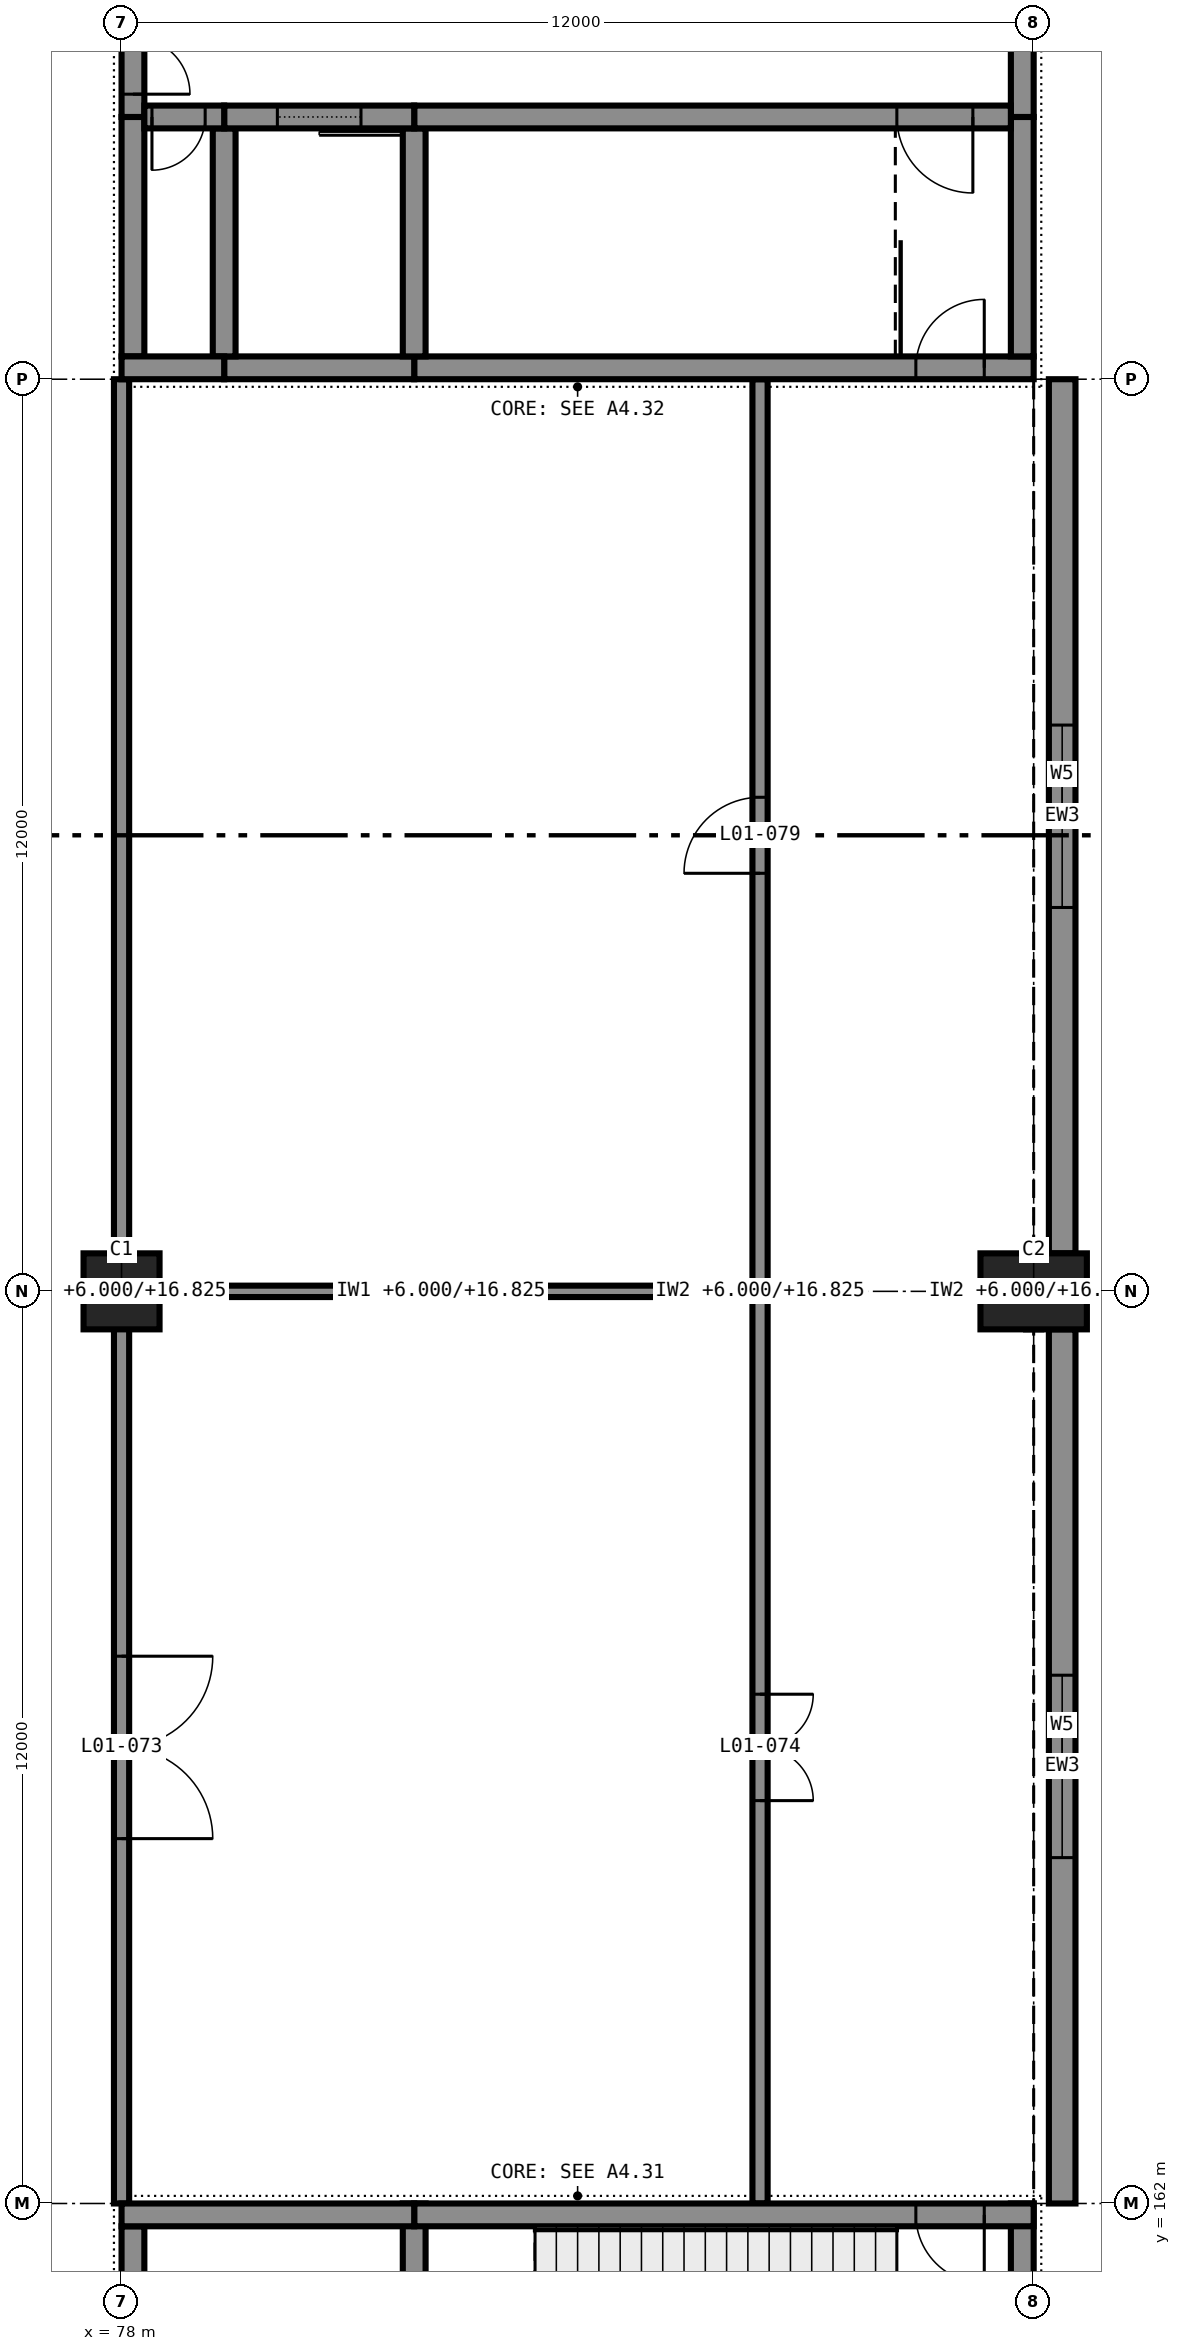
"""IFC4 building model, lengths in metres.
Left out: names, types, materials, properties, quantities, classifications, styles, units other than length and angle.
Written with IfcOpenShell. Run it as: python <this file> out.ifc"""

import sys

from ifc_helpers import new_model, si_unit, direction, frame, frame_2d, origin, origin_2d, place, context, subcontext, project, spatial, rectangle, extrude, element, fill, save


model = new_model("IFC4")
c1 = context("Model", 3, precision=1e-05, world=origin(), true_north=direction((0.0, 1.0)))
c2 = subcontext(c1, "Body", "Model", "MODEL_VIEW")
j1 = project(units=[si_unit("LENGTHUNIT", "METRE"), si_unit("PLANEANGLEUNIT", "RADIAN")], contexts=[c1])
p1 = place(None, origin())
s1 = spatial("IfcSite", under=j1, at=p1, CompositionType="ELEMENT")
p2 = place(p1, origin())
s2 = spatial("IfcBuilding", under=s1, at=p2, CompositionType="ELEMENT")
p3 = place(p2, frame((0.0, 0.0, 6.0)))
s3 = spatial("IfcBuildingStorey", under=s2, at=p3, CompositionType="ELEMENT", Elevation=6.0)
p4 = place(p3, frame((78.0, 174.0, 0.0), z_axis=(0.0, 0.0, 1.0), x_axis=(1.0, 0.0, 0.0)))
e1 = element("IfcColumn", 1, at=p4, inside=s3, PredefinedType="COLUMN", context=c2, shape_type="SweptSolid", body=[
    extrude(rectangle(XDim=1.0, YDim=1.0, at=origin_2d()), origin(), (0.0, 0.0, 1.0), 6.0),
])
p5 = place(p3, frame((90.0, 174.0, 0.0), z_axis=(0.0, 0.0, 1.0), x_axis=(1.0, 0.0, 0.0)))
e2 = element("IfcColumn", 2, at=p5, inside=s3, PredefinedType="COLUMN", context=c2, shape_type="SweptSolid", body=[
    extrude(rectangle(XDim=1.4, YDim=1.0, at=origin_2d()), origin(), (0.0, 0.0, 1.0), 6.0),
])
p6 = place(p3, frame((90.0, 161.85, 0.0), z_axis=(0.0, 0.0, 1.0), x_axis=(-1.0, 0.0, 0.0)))
e3 = element("IfcWall", 3, at=p6, inside=s3, PredefinedType="SHEAR", context=c2, shape_type="SweptSolid", body=[
    extrude(rectangle(XDim=8.15, YDim=0.3, at=frame_2d((4.075, 0.0))), origin(), (0.0, 0.0, 1.0), 5.75),
])
p7 = place(p6, frame((0.65, 0.0, 0.0)))
e4 = element("IfcOpeningElement", 4, at=p7, cuts=e3, PredefinedType="OPENING", context=c2, shape_type="SweptSolid", body=[
    extrude(rectangle(XDim=0.9, YDim=2.1, at=frame_2d((0.45, 1.05))), frame((0.0, 0.16, 0.0), z_axis=(0.0, -1.0, 0.0), x_axis=(1.0, 0.0, 0.0)), (0.0, 0.0, 1.0), 0.32),
])
p8 = place(p3, frame((81.85, 161.85, 0.0), z_axis=(0.0, 0.0, 1.0), x_axis=(-1.0, 0.0, 0.0)))
e5 = element("IfcWall", 5, at=p8, inside=s3, PredefinedType="SHEAR", context=c2, shape_type="SweptSolid", body=[
    extrude(rectangle(XDim=3.85, YDim=0.3, at=frame_2d((1.925, 0.0))), origin(), (0.0, 0.0, 1.0), 5.75),
])
p9 = place(p3, frame((89.85, 158.55, 0.0), z_axis=(0.0, 0.0, 1.0), x_axis=(0.0, 1.0, 0.0)))
e6 = element("IfcWall", 6, at=p9, inside=s3, PredefinedType="SHEAR", context=c2, shape_type="SweptSolid", body=[
    extrude(rectangle(XDim=3.45, YDim=0.3, at=frame_2d((1.725, 0.0))), origin(), (0.0, 0.0, 1.0), 5.75),
])
p10 = place(p3, frame((78.15, 158.55, 0.0), z_axis=(0.0, 0.0, 1.0), x_axis=(0.0, 1.0, 0.0)))
e7 = element("IfcWall", 7, at=p10, inside=s3, PredefinedType="SHEAR", context=c2, shape_type="SweptSolid", body=[
    extrude(rectangle(XDim=3.15, YDim=0.3, at=frame_2d((1.575, 0.0))), origin(), (0.0, 0.0, 1.0), 5.75),
])
p11 = place(p10, frame((1.15, 0.0, 0.0)))
e8 = element("IfcOpeningElement", 8, at=p11, cuts=e7, PredefinedType="OPENING", context=c2, shape_type="SweptSolid", body=[
    extrude(rectangle(XDim=1.0, YDim=2.1, at=frame_2d((0.5, 1.05))), frame((0.0, 0.16, 0.0), z_axis=(0.0, -1.0, 0.0), x_axis=(1.0, 0.0, 0.0)), (0.0, 0.0, 1.0), 0.32),
])
p12 = place(p3, frame((81.85, 158.7, 0.0), z_axis=(0.0, 0.0, 1.0), x_axis=(0.0, 1.0, 0.0)))
e9 = element("IfcWall", 9, at=p12, inside=s3, PredefinedType="SHEAR", context=c2, shape_type="SweptSolid", body=[
    extrude(rectangle(XDim=3.3, YDim=0.3, at=frame_2d((1.65, 0.0))), origin(), (0.0, 0.0, 1.0), 5.75),
])
p13 = place(p3, frame((90.0, 186.15, 0.0), z_axis=(0.0, 0.0, 1.0), x_axis=(-1.0, 0.0, 0.0)))
e10 = element("IfcWall", 10, at=p13, inside=s3, PredefinedType="SHEAR", context=c2, shape_type="SweptSolid", body=[
    extrude(rectangle(XDim=8.15, YDim=0.3, at=frame_2d((4.075, 0.0))), origin(), (0.0, 0.0, 1.0), 6.0),
])
p14 = place(p13, frame((0.65, 0.0, 0.0)))
e11 = element("IfcOpeningElement", 11, at=p14, cuts=e10, PredefinedType="OPENING", context=c2, shape_type="SweptSolid", body=[
    extrude(rectangle(XDim=0.9, YDim=2.1, at=frame_2d((0.45, 1.05))), frame((0.0, 0.16, 0.0), z_axis=(0.0, -1.0, 0.0), x_axis=(1.0, 0.0, 0.0)), (0.0, 0.0, 1.0), 0.32),
])
p15 = place(p3, frame((81.85, 186.15, 0.0), z_axis=(0.0, 0.0, 1.0), x_axis=(-1.0, 0.0, 0.0)))
e12 = element("IfcWall", 12, at=p15, inside=s3, PredefinedType="SHEAR", context=c2, shape_type="SweptSolid", body=[
    extrude(rectangle(XDim=2.5, YDim=0.3, at=frame_2d((1.25, 0.0))), origin(), (0.0, 0.0, 1.0), 6.0),
])
p16 = place(p3, frame((79.35, 186.15, 0.0), z_axis=(0.0, 0.0, 1.0), x_axis=(-1.0, 0.0, 0.0)))
e13 = element("IfcWall", 13, at=p16, inside=s3, PredefinedType="SHEAR", context=c2, shape_type="SweptSolid", body=[
    extrude(rectangle(XDim=1.35, YDim=0.3, at=frame_2d((0.675, 0.0))), origin(), (0.0, 0.0, 1.0), 6.0),
])
p17 = place(p3, frame((89.7, 189.45, 0.0), z_axis=(0.0, 0.0, 1.0), x_axis=(-1.0, 0.0, 0.0)))
e14 = element("IfcWall", 14, at=p17, inside=s3, PredefinedType="SHEAR", context=c2, shape_type="SweptSolid", body=[
    extrude(rectangle(XDim=7.85, YDim=0.3, at=frame_2d((3.925, 0.0))), origin(), (0.0, 0.0, 1.0), 6.0),
])
p18 = place(p17, frame((0.5, 0.0, 0.0)))
e15 = element("IfcOpeningElement", 15, at=p18, cuts=e14, PredefinedType="OPENING", context=c2, shape_type="SweptSolid", body=[
    extrude(rectangle(XDim=1.0, YDim=2.1, at=frame_2d((0.5, 1.05))), frame((0.0, 0.16, 0.0), z_axis=(0.0, -1.0, 0.0), x_axis=(1.0, 0.0, 0.0)), (0.0, 0.0, 1.0), 0.32),
])
p19 = place(p3, frame((81.85, 189.45, 0.0), z_axis=(0.0, 0.0, 1.0), x_axis=(-1.0, 0.0, 0.0)))
e16 = element("IfcWall", 16, at=p19, inside=s3, PredefinedType="SHEAR", context=c2, shape_type="SweptSolid", body=[
    extrude(rectangle(XDim=2.5, YDim=0.3, at=frame_2d((1.25, 0.0))), origin(), (0.0, 0.0, 1.0), 6.0),
])
p20 = place(p19, frame((0.7, 0.0, 0.0)))
e17 = element("IfcOpeningElement", 17, at=p20, cuts=e16, PredefinedType="OPENING", context=c2, shape_type="SweptSolid", body=[
    extrude(rectangle(XDim=1.1, YDim=2.1, at=frame_2d((0.55, 1.05))), frame((0.0, 0.16, 0.0), z_axis=(0.0, -1.0, 0.0), x_axis=(1.0, 0.0, 0.0)), (0.0, 0.0, 1.0), 0.32),
])
p21 = place(p3, frame((79.35, 189.45, 0.0), z_axis=(0.0, 0.0, 1.0), x_axis=(-1.0, 0.0, 0.0)))
e18 = element("IfcWall", 18, at=p21, inside=s3, PredefinedType="SHEAR", context=c2, shape_type="SweptSolid", body=[
    extrude(rectangle(XDim=1.05, YDim=0.3, at=frame_2d((0.525, 0.0))), origin(), (0.0, 0.0, 1.0), 6.0),
])
p22 = place(p21, frame((0.25, 0.0, 0.0)))
e19 = element("IfcOpeningElement", 19, at=p22, cuts=e18, PredefinedType="OPENING", context=c2, shape_type="SweptSolid", body=[
    extrude(rectangle(XDim=0.7, YDim=2.1, at=frame_2d((0.35, 1.05))), frame((0.0, 0.16, 0.0), z_axis=(0.0, -1.0, 0.0), x_axis=(1.0, 0.0, 0.0)), (0.0, 0.0, 1.0), 0.32),
])
p23 = place(p3, frame((89.85, 186.3, 0.0), z_axis=(0.0, 0.0, 1.0), x_axis=(0.0, 1.0, 0.0)))
e20 = element("IfcWall", 20, at=p23, inside=s3, PredefinedType="SHEAR", context=c2, shape_type="SweptSolid", body=[
    extrude(rectangle(XDim=3.15, YDim=0.3, at=frame_2d((1.575, 0.0))), origin(), (0.0, 0.0, 1.0), 6.0),
])
p24 = place(p3, frame((89.85, 189.45, 0.0), z_axis=(0.0, 0.0, 1.0), x_axis=(0.0, 1.0, 0.0)))
e21 = element("IfcWall", 21, at=p24, inside=s3, PredefinedType="SHEAR", context=c2, shape_type="SweptSolid", body=[
    extrude(rectangle(XDim=5.1, YDim=0.3, at=frame_2d((2.55, 0.0))), origin(), (0.0, 0.0, 1.0), 6.0),
])
p25 = place(p3, frame((78.15, 186.3, 0.0), z_axis=(0.0, 0.0, 1.0), x_axis=(0.0, 1.0, 0.0)))
e22 = element("IfcWall", 22, at=p25, inside=s3, PredefinedType="SHEAR", context=c2, shape_type="SweptSolid", body=[
    extrude(rectangle(XDim=3.15, YDim=0.3, at=frame_2d((1.575, 0.0))), origin(), (0.0, 0.0, 1.0), 6.0),
])
p26 = place(p3, frame((78.15, 189.45, 0.0), z_axis=(0.0, 0.0, 1.0), x_axis=(0.0, 1.0, 0.0)))
e23 = element("IfcWall", 23, at=p26, inside=s3, PredefinedType="SHEAR", context=c2, shape_type="SweptSolid", body=[
    extrude(rectangle(XDim=5.1, YDim=0.3, at=frame_2d((2.55, 0.0))), origin(), (0.0, 0.0, 1.0), 6.0),
])
p27 = place(p26, frame((0.3, 0.0, 0.0)))
e24 = element("IfcOpeningElement", 24, at=p27, cuts=e23, PredefinedType="OPENING", context=c2, shape_type="SweptSolid", body=[
    extrude(rectangle(XDim=1.5, YDim=2.1, at=frame_2d((0.75, 1.05))), frame((0.0, 0.16, 0.0), z_axis=(0.0, -1.0, 0.0), x_axis=(1.0, 0.0, 0.0)), (0.0, 0.0, 1.0), 0.32),
])
for number, where, z_axis, x_axis in (
    (25, (81.85, 186.3, 0.0), (0.0, 0.0, 1.0), (0.0, 1.0, 0.0)),
    (26, (79.35, 186.3, 0.0), (0.0, 0.0, 1.0), (0.0, 1.0, 0.0)),
):
    element("IfcWall", number, at=place(p3, frame(where, z_axis=z_axis, x_axis=x_axis)), inside=s3, PredefinedType="SHEAR", context=c2, shape_type="SweptSolid", body=[
        extrude(rectangle(XDim=3.0, YDim=0.3, at=frame_2d((1.5, 0.0))), origin(), (0.0, 0.0, 1.0), 6.0),
    ])
p28 = place(p3, frame((90.375, 162.0, 0.0), z_axis=(0.0, 0.0, 1.0), x_axis=(0.0, 1.0, 0.0)))
e27 = element("IfcWall", 27, at=p28, inside=s3, PredefinedType="STANDARD", context=c2, shape_type="SweptSolid", body=[
    extrude(rectangle(XDim=11.5, YDim=0.35, at=frame_2d((5.75, 0.0))), origin(), (0.0, 0.0, 1.0), 6.0),
])
p29 = place(p28, frame((4.55, 0.0, 0.9)))
e28 = element("IfcOpeningElement", 28, at=p29, cuts=e27, PredefinedType="OPENING", context=c2, shape_type="SweptSolid", body=[
    extrude(rectangle(XDim=2.4, YDim=1.8, at=frame_2d((1.2, 0.9))), frame((0.0, 0.185, 0.0), z_axis=(0.0, -1.0, 0.0), x_axis=(1.0, 0.0, 0.0)), (0.0, 0.0, 1.0), 0.37),
])
p30 = place(p3, frame((90.375, 174.5, 0.0), z_axis=(0.0, 0.0, 1.0), x_axis=(0.0, 1.0, 0.0)))
e29 = element("IfcWall", 29, at=p30, inside=s3, PredefinedType="STANDARD", context=c2, shape_type="SweptSolid", body=[
    extrude(rectangle(XDim=11.5, YDim=0.35, at=frame_2d((5.75, 0.0))), origin(), (0.0, 0.0, 1.0), 6.0),
])
p31 = place(p30, frame((4.55, 0.0, 0.9)))
e30 = element("IfcOpeningElement", 30, at=p31, cuts=e29, PredefinedType="OPENING", context=c2, shape_type="SweptSolid", body=[
    extrude(rectangle(XDim=2.4, YDim=1.8, at=frame_2d((1.2, 0.9))), frame((0.0, 0.185, 0.0), z_axis=(0.0, -1.0, 0.0), x_axis=(1.0, 0.0, 0.0)), (0.0, 0.0, 1.0), 0.37),
])
p32 = place(p3, frame((78.1, 174.0, 0.0), z_axis=(0.0, 0.0, 1.0), x_axis=(1.0, 0.0, 0.0)))
e31 = element("IfcWall", 31, at=p32, inside=s3, PredefinedType="PARTITIONING", context=c2, shape_type="SweptSolid", body=[
    extrude(rectangle(XDim=8.2, YDim=0.15, at=frame_2d((4.1, 0.0))), origin(), (0.0, 0.0, 1.0), 10.825),
])
p33 = place(p3, frame((78.0, 162.0, 0.0), z_axis=(0.0, 0.0, 1.0), x_axis=(0.0, 1.0, 0.0)))
e32 = element("IfcWall", 32, at=p33, inside=s3, PredefinedType="PARTITIONING", context=c2, shape_type="SweptSolid", body=[
    extrude(rectangle(XDim=24.0, YDim=0.2, at=frame_2d((12.0, 0.0))), origin(), (0.0, 0.0, 1.0), 10.825),
])
p34 = place(p33, frame((4.8, 0.0, 0.0)))
e33 = element("IfcOpeningElement", 33, at=p34, cuts=e32, PredefinedType="OPENING", context=c2, shape_type="SweptSolid", body=[
    extrude(rectangle(XDim=2.4, YDim=2.4, at=frame_2d((1.2, 1.2))), frame((0.0, 0.11, 0.0), z_axis=(0.0, -1.0, 0.0), x_axis=(1.0, 0.0, 0.0)), (0.0, 0.0, 1.0), 0.22),
])
p35 = place(p3, frame((86.4, 162.0, 0.0), z_axis=(0.0, 0.0, 1.0), x_axis=(0.0, 1.0, 0.0)))
e34 = element("IfcWall", 34, at=p35, inside=s3, PredefinedType="PARTITIONING", context=c2, shape_type="SweptSolid", body=[
    extrude(rectangle(XDim=24.0, YDim=0.2, at=frame_2d((12.0, 0.0))), origin(), (0.0, 0.0, 1.0), 10.825),
])
p36 = place(p35, frame((5.3, 0.0, 0.0)))
e35 = element("IfcOpeningElement", 35, at=p36, cuts=e34, PredefinedType="OPENING", context=c2, shape_type="SweptSolid", body=[
    extrude(rectangle(XDim=1.4, YDim=2.1, at=frame_2d((0.7, 1.05))), frame((0.0, 0.11, 0.0), z_axis=(0.0, -1.0, 0.0), x_axis=(1.0, 0.0, 0.0)), (0.0, 0.0, 1.0), 0.22),
])
p37 = place(p35, frame((17.5, 0.0, 0.0)))
e36 = element("IfcOpeningElement", 36, at=p37, cuts=e34, PredefinedType="OPENING", context=c2, shape_type="SweptSolid", body=[
    extrude(rectangle(XDim=1.0, YDim=2.1, at=frame_2d((0.5, 1.05))), frame((0.0, 0.11, 0.0), z_axis=(0.0, -1.0, 0.0), x_axis=(1.0, 0.0, 0.0)), (0.0, 0.0, 1.0), 0.22),
])
p38 = place(p3, frame((90.0, 173.5, 0.0), z_axis=(0.0, 0.0, 1.0), x_axis=(0.0, 1.0, 0.0)))
e37 = element("IfcWall", 37, at=p38, inside=s3, PredefinedType="PARTITIONING", context=c2, shape_type="SweptSolid", body=[
    extrude(rectangle(XDim=1.0, YDim=0.2, at=frame_2d((0.5, 0.0))), origin(), (0.0, 0.0, 1.0), 10.825),
])
p39 = place(p29, origin())
e38 = element("IfcWindow", 38, at=p39, inside=s3, PartitioningType="SINGLE_PANEL", PredefinedType="WINDOW", context=c2, shape_type="SweptSolid", body=[
    extrude(rectangle(XDim=2.4, YDim=1.8, at=frame_2d((1.2, 0.9))), frame((0.0, 0.03, 0.0), z_axis=(0.0, -1.0, 0.0), x_axis=(1.0, 0.0, 0.0)), (0.0, 0.0, 1.0), 0.06),
])
fill(e28, e38)
p40 = place(p31, origin())
e39 = element("IfcWindow", 39, at=p40, inside=s3, PartitioningType="SINGLE_PANEL", PredefinedType="WINDOW", context=c2, shape_type="SweptSolid", body=[
    extrude(rectangle(XDim=2.4, YDim=1.8, at=frame_2d((1.2, 0.9))), frame((0.0, 0.03, 0.0), z_axis=(0.0, -1.0, 0.0), x_axis=(1.0, 0.0, 0.0)), (0.0, 0.0, 1.0), 0.06),
])
fill(e30, e39)
p41 = place(p7, origin())
e40 = element("IfcDoor", 40, at=p41, inside=s3, OperationType="SINGLE_SWING_RIGHT", PredefinedType="DOOR", context=c2, shape_type="SweptSolid", body=[
    extrude(rectangle(XDim=0.9, YDim=2.1, at=frame_2d((0.45, 1.05))), frame((0.0, 0.025, 0.0), z_axis=(0.0, -1.0, 0.0), x_axis=(1.0, 0.0, 0.0)), (0.0, 0.0, 1.0), 0.05),
])
fill(e4, e40)
p42 = place(p34, frame((2.4, 0.0, 0.0), z_axis=(0.0, 0.0, 1.0), x_axis=(-1.0, 0.0, 0.0)))
e41 = element("IfcDoor", 41, at=p42, inside=s3, OperationType="DOUBLE_DOOR_SINGLE_SWING", PredefinedType="DOOR", context=c2, shape_type="SweptSolid", body=[
    extrude(rectangle(XDim=2.4, YDim=2.4, at=frame_2d((1.2, 1.2))), frame((0.0, 0.025, 0.0), z_axis=(0.0, -1.0, 0.0), x_axis=(1.0, 0.0, 0.0)), (0.0, 0.0, 1.0), 0.05),
])
fill(e33, e41)
p43 = place(p36, frame((1.4, 0.0, 0.0), z_axis=(0.0, 0.0, 1.0), x_axis=(-1.0, 0.0, 0.0)))
e42 = element("IfcDoor", 42, at=p43, inside=s3, OperationType="DOUBLE_DOOR_SINGLE_SWING", PredefinedType="DOOR", context=c2, shape_type="SweptSolid", body=[
    extrude(rectangle(XDim=1.4, YDim=2.1, at=frame_2d((0.7, 1.05))), frame((0.0, 0.025, 0.0), z_axis=(0.0, -1.0, 0.0), x_axis=(1.0, 0.0, 0.0)), (0.0, 0.0, 1.0), 0.05),
])
fill(e35, e42)
p44 = place(p37, origin())
e43 = element("IfcDoor", 43, at=p44, inside=s3, OperationType="SINGLE_SWING_RIGHT", PredefinedType="DOOR", context=c2, shape_type="SweptSolid", body=[
    extrude(rectangle(XDim=1.0, YDim=2.1, at=frame_2d((0.5, 1.05))), frame((0.0, 0.025, 0.0), z_axis=(0.0, -1.0, 0.0), x_axis=(1.0, 0.0, 0.0)), (0.0, 0.0, 1.0), 0.05),
])
fill(e36, e43)
p45 = place(p14, frame((0.9, 0.0, 0.0), z_axis=(0.0, 0.0, 1.0), x_axis=(-1.0, 0.0, 0.0)))
e44 = element("IfcDoor", 44, at=p45, inside=s3, OperationType="SINGLE_SWING_LEFT", PredefinedType="DOOR", context=c2, shape_type="SweptSolid", body=[
    extrude(rectangle(XDim=0.9, YDim=2.1, at=frame_2d((0.45, 1.05))), frame((0.0, 0.025, 0.0), z_axis=(0.0, -1.0, 0.0), x_axis=(1.0, 0.0, 0.0)), (0.0, 0.0, 1.0), 0.05),
])
fill(e11, e44)
p46 = place(p22, origin())
e45 = element("IfcDoor", 45, at=p46, inside=s3, OperationType="SINGLE_SWING_LEFT", PredefinedType="DOOR", context=c2, shape_type="SweptSolid", body=[
    extrude(rectangle(XDim=0.7, YDim=2.1, at=frame_2d((0.35, 1.05))), frame((0.0, 0.025, 0.0), z_axis=(0.0, -1.0, 0.0), x_axis=(1.0, 0.0, 0.0)), (0.0, 0.0, 1.0), 0.05),
])
fill(e19, e45)
p47 = place(p20, origin())
e46 = element("IfcDoor", 46, at=p47, inside=s3, OperationType="SLIDING_TO_LEFT", PredefinedType="DOOR", context=c2, shape_type="SweptSolid", body=[
    extrude(rectangle(XDim=1.1, YDim=2.1, at=frame_2d((0.55, 1.05))), frame((0.0, 0.025, 0.0), z_axis=(0.0, -1.0, 0.0), x_axis=(1.0, 0.0, 0.0)), (0.0, 0.0, 1.0), 0.05),
])
fill(e17, e46)
p48 = place(p18, origin())
e47 = element("IfcDoor", 47, at=p48, inside=s3, OperationType="SINGLE_SWING_RIGHT", PredefinedType="DOOR", context=c2, shape_type="SweptSolid", body=[
    extrude(rectangle(XDim=1.0, YDim=2.1, at=frame_2d((0.5, 1.05))), frame((0.0, 0.025, 0.0), z_axis=(0.0, -1.0, 0.0), x_axis=(1.0, 0.0, 0.0)), (0.0, 0.0, 1.0), 0.05),
])
fill(e15, e47)
p49 = place(p27, frame((1.5, 0.0, 0.0), z_axis=(0.0, 0.0, 1.0), x_axis=(-1.0, 0.0, 0.0)))
e48 = element("IfcDoor", 48, at=p49, inside=s3, OperationType="DOUBLE_DOOR_SINGLE_SWING", PredefinedType="DOOR", context=c2, shape_type="SweptSolid", body=[
    extrude(rectangle(XDim=1.5, YDim=2.1, at=frame_2d((0.75, 1.05))), frame((0.0, 0.025, 0.0), z_axis=(0.0, -1.0, 0.0), x_axis=(1.0, 0.0, 0.0)), (0.0, 0.0, 1.0), 0.05),
])
fill(e24, e48)
save(model, sys.argv[1])
